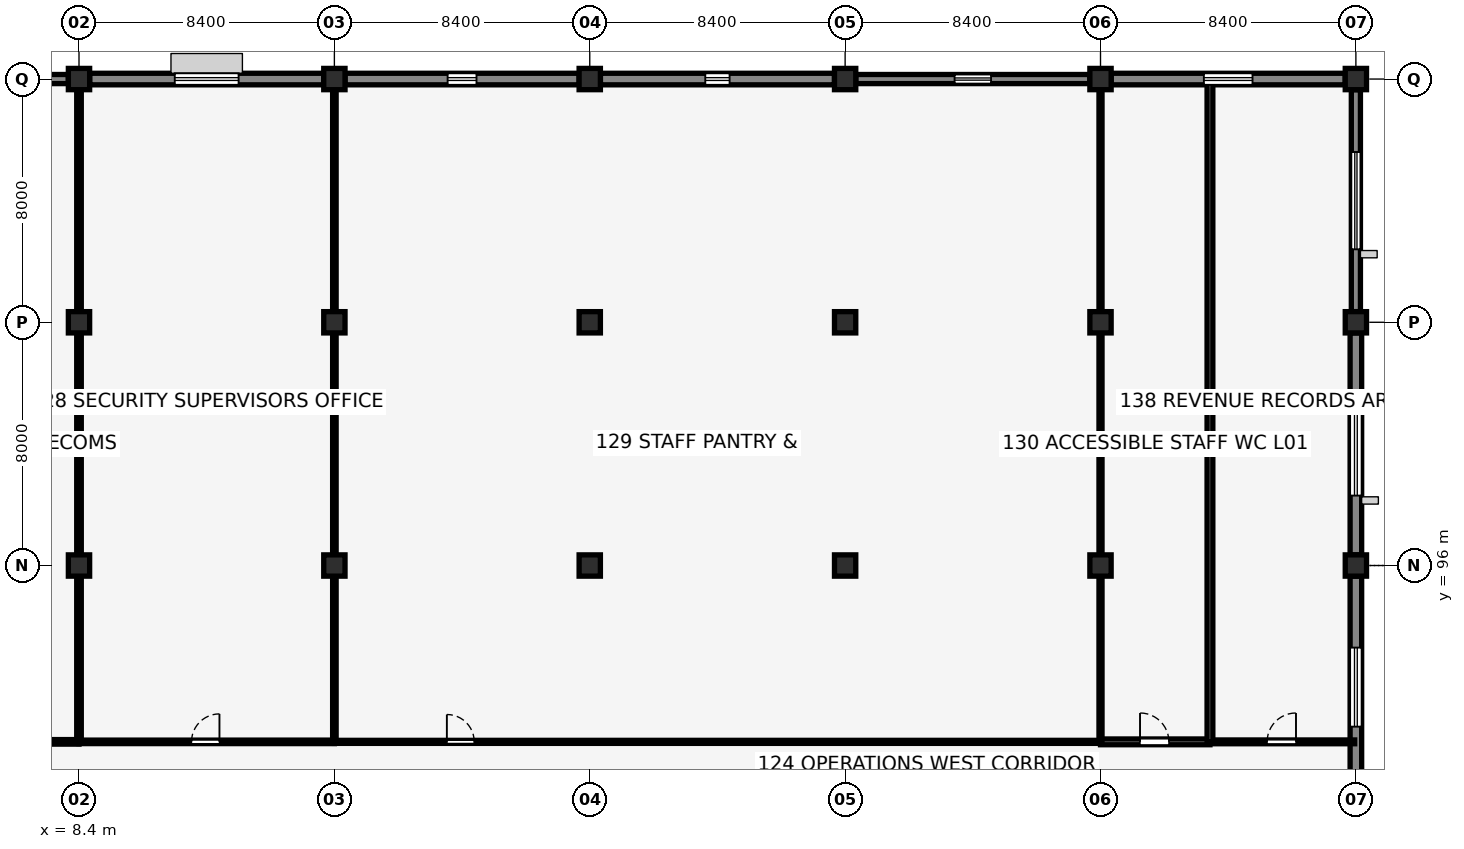
"""IFC4 building model, lengths in metres.
Left out: names, types, materials, properties, quantities, classifications, styles, units other than length and angle.
Written with IfcOpenShell. Run it as: python <this file> out.ifc"""

import sys

from ifc_helpers import new_model, si_unit, direction, frame, frame_2d, origin, origin_2d, place, context, subcontext, project, spatial, rectangle, extrude, element, fill, save


model = new_model("IFC4")
c1 = context("Model", 3, precision=1e-05, world=origin(), true_north=direction((0.0, 1.0)))
c2 = subcontext(c1, "Body", "Model", "MODEL_VIEW")
j1 = project(units=[si_unit("LENGTHUNIT", "METRE"), si_unit("PLANEANGLEUNIT", "RADIAN")], contexts=[c1])
p1 = place(None, origin())
s1 = spatial("IfcSite", under=j1, at=p1, CompositionType="ELEMENT")
p2 = place(p1, origin())
s2 = spatial("IfcBuilding", under=s1, at=p2, CompositionType="ELEMENT")
p3 = place(p2, frame((0.0, 0.0, 5.44)))
s3 = spatial("IfcBuildingStorey", under=s2, at=p3, CompositionType="ELEMENT", Elevation=5.44)
for number, where, z_axis, x_axis in (
    (1, (8.4, 96.0, 0.0), (0.0, 0.0, 1.0), (1.0, 0.0, 0.0)),
    (2, (8.4, 104.0, 0.0), (0.0, 0.0, 1.0), (1.0, 0.0, 0.0)),
    (3, (8.4, 112.0, 0.0), (0.0, 0.0, 1.0), (1.0, 0.0, 0.0)),
    (4, (16.8, 96.0, 0.0), (0.0, 0.0, 1.0), (1.0, 0.0, 0.0)),
    (5, (16.8, 104.0, 0.0), (0.0, 0.0, 1.0), (1.0, 0.0, 0.0)),
    (6, (16.8, 112.0, 0.0), (0.0, 0.0, 1.0), (1.0, 0.0, 0.0)),
    (7, (25.2, 96.0, 0.0), (0.0, 0.0, 1.0), (1.0, 0.0, 0.0)),
    (8, (25.2, 104.0, 0.0), (0.0, 0.0, 1.0), (1.0, 0.0, 0.0)),
    (9, (25.2, 112.0, 0.0), (0.0, 0.0, 1.0), (1.0, 0.0, 0.0)),
    (10, (33.6, 96.0, 0.0), (0.0, 0.0, 1.0), (1.0, 0.0, 0.0)),
    (11, (33.6, 104.0, 0.0), (0.0, 0.0, 1.0), (1.0, 0.0, 0.0)),
    (12, (33.6, 112.0, 0.0), (0.0, 0.0, 1.0), (1.0, 0.0, 0.0)),
    (13, (42.0, 96.0, 0.0), (0.0, 0.0, 1.0), (1.0, 0.0, 0.0)),
    (14, (42.0, 104.0, 0.0), (0.0, 0.0, 1.0), (1.0, 0.0, 0.0)),
    (15, (42.0, 112.0, 0.0), (0.0, 0.0, 1.0), (1.0, 0.0, 0.0)),
    (16, (50.4, 96.0, 0.0), (0.0, 0.0, 1.0), (1.0, 0.0, 0.0)),
    (17, (50.4, 104.0, 0.0), (0.0, 0.0, 1.0), (1.0, 0.0, 0.0)),
    (18, (50.4, 112.0, 0.0), (0.0, 0.0, 1.0), (1.0, 0.0, 0.0)),
):
    element("IfcColumn", number, at=place(p3, frame(where, z_axis=z_axis, x_axis=x_axis)), inside=s3, PredefinedType="COLUMN", context=c2, shape_type="SweptSolid", body=[
        extrude(rectangle(XDim=0.7, YDim=0.7, at=origin_2d()), origin(), (0.0, 0.0, 1.0), 3.8),
    ])
p4 = place(p3, frame((0.35, 112.0, 0.0), z_axis=(0.0, 0.0, 1.0), x_axis=(1.0, 0.0, 0.0)))
e19 = element("IfcWall", 19, at=p4, inside=s3, PredefinedType="SOLIDWALL", context=c2, shape_type="SweptSolid", body=[
    extrude(rectangle(XDim=7.7, YDim=0.3, at=frame_2d((3.85, 0.0))), origin(), (0.0, 0.0, 1.0), 3.45),
])
p5 = place(p4, frame((2.55, 0.0, 1.55), z_axis=(0.0, 0.0, 1.0), x_axis=(1.0, 0.0, 0.0)))
e20 = element("IfcOpeningElement", 20, at=p5, cuts=e19, PredefinedType="OPENING", context=c2, shape_type="SweptSolid", body=[
    extrude(rectangle(XDim=2.6, YDim=0.85, at=frame_2d((1.3, 0.425))), frame((0.0, 0.16, 0.0), z_axis=(0.0, -1.0, 0.0), x_axis=(1.0, 0.0, 0.0)), (0.0, 0.0, 1.0), 0.32),
])
p6 = place(p3, frame((8.75, 112.0, 0.0), z_axis=(0.0, 0.0, 1.0), x_axis=(1.0, 0.0, 0.0)))
e21 = element("IfcWall", 21, at=p6, inside=s3, PredefinedType="SOLIDWALL", context=c2, shape_type="SweptSolid", body=[
    extrude(rectangle(XDim=7.7, YDim=0.38, at=frame_2d((3.85, 0.0))), origin(), (0.0, 0.0, 1.0), 3.45),
])
p7 = place(p6, frame((2.8, 0.0, 1.55), z_axis=(0.0, 0.0, 1.0), x_axis=(1.0, 0.0, 0.0)))
e22 = element("IfcOpeningElement", 22, at=p7, cuts=e21, PredefinedType="OPENING", context=c2, shape_type="SweptSolid", body=[
    extrude(rectangle(XDim=2.1, YDim=0.8, at=frame_2d((1.05, 0.4))), frame((0.0, 0.2, 0.0), z_axis=(0.0, -1.0, 0.0), x_axis=(1.0, 0.0, 0.0)), (0.0, 0.0, 1.0), 0.4),
])
p8 = place(p3, frame((17.15, 112.0, 0.0), z_axis=(0.0, 0.0, 1.0), x_axis=(1.0, 0.0, 0.0)))
e23 = element("IfcWall", 23, at=p8, inside=s3, PredefinedType="SOLIDWALL", context=c2, shape_type="SweptSolid", body=[
    extrude(rectangle(XDim=7.7, YDim=0.38, at=frame_2d((3.85, 0.0))), origin(), (0.0, 0.0, 1.0), 3.45),
])
p9 = place(p8, frame((3.375, 0.0, 0.65), z_axis=(0.0, 0.0, 1.0), x_axis=(1.0, 0.0, 0.0)))
e24 = element("IfcOpeningElement", 24, at=p9, cuts=e23, PredefinedType="OPENING", context=c2, shape_type="SweptSolid", body=[
    extrude(rectangle(XDim=0.95, YDim=2.1, at=frame_2d((0.475, 1.05))), frame((0.0, 0.2, 0.0), z_axis=(0.0, -1.0, 0.0), x_axis=(1.0, 0.0, 0.0)), (0.0, 0.0, 1.0), 0.4),
])
p10 = place(p3, frame((25.55, 112.0, 0.0), z_axis=(0.0, 0.0, 1.0), x_axis=(1.0, 0.0, 0.0)))
e25 = element("IfcWall", 25, at=p10, inside=s3, PredefinedType="SOLIDWALL", context=c2, shape_type="SweptSolid", body=[
    extrude(rectangle(XDim=7.7, YDim=0.38, at=frame_2d((3.85, 0.0))), origin(), (0.0, 0.0, 1.0), 3.45),
])
p11 = place(p10, frame((3.45, 0.0, 0.65), z_axis=(0.0, 0.0, 1.0), x_axis=(1.0, 0.0, 0.0)))
e26 = element("IfcOpeningElement", 26, at=p11, cuts=e25, PredefinedType="OPENING", context=c2, shape_type="SweptSolid", body=[
    extrude(rectangle(XDim=0.8, YDim=1.85, at=frame_2d((0.4, 0.925))), frame((0.0, 0.2, 0.0), z_axis=(0.0, -1.0, 0.0), x_axis=(1.0, 0.0, 0.0)), (0.0, 0.0, 1.0), 0.4),
])
p12 = place(p3, frame((33.95, 112.0, 0.0), z_axis=(0.0, 0.0, 1.0), x_axis=(1.0, 0.0, 0.0)))
e27 = element("IfcWall", 27, at=p12, inside=s3, PredefinedType="SOLIDWALL", context=c2, shape_type="SweptSolid", body=[
    extrude(rectangle(XDim=7.7, YDim=0.3, at=frame_2d((3.85, 0.0))), origin(), (0.0, 0.0, 1.0), 3.45),
])
p13 = place(p12, frame((3.25, 0.0, 1.55), z_axis=(0.0, 0.0, 1.0), x_axis=(1.0, 0.0, 0.0)))
e28 = element("IfcOpeningElement", 28, at=p13, cuts=e27, PredefinedType="OPENING", context=c2, shape_type="SweptSolid", body=[
    extrude(rectangle(XDim=1.2, YDim=0.95, at=frame_2d((0.6, 0.475))), frame((0.0, 0.16, 0.0), z_axis=(0.0, -1.0, 0.0), x_axis=(1.0, 0.0, 0.0)), (0.0, 0.0, 1.0), 0.32),
])
p14 = place(p3, frame((42.35, 112.0, 0.0), z_axis=(0.0, 0.0, 1.0), x_axis=(1.0, 0.0, 0.0)))
e29 = element("IfcWall", 29, at=p14, inside=s3, PredefinedType="SOLIDWALL", context=c2, shape_type="SweptSolid", body=[
    extrude(rectangle(XDim=7.7, YDim=0.38, at=frame_2d((3.85, 0.0))), origin(), (0.0, 0.0, 1.0), 3.45),
])
p15 = place(p14, frame((3.05, 0.0, 0.9), z_axis=(0.0, 0.0, 1.0), x_axis=(1.0, 0.0, 0.0)))
e30 = element("IfcOpeningElement", 30, at=p15, cuts=e29, PredefinedType="OPENING", context=c2, shape_type="SweptSolid", body=[
    extrude(rectangle(XDim=1.6, YDim=1.2, at=frame_2d((0.8, 0.6))), frame((0.0, 0.2, 0.0), z_axis=(0.0, -1.0, 0.0), x_axis=(1.0, 0.0, 0.0)), (0.0, 0.0, 1.0), 0.4),
])
p16 = place(p3, frame((50.4, 88.35, 0.0), z_axis=(0.0, 0.0, 1.0), x_axis=(0.0, 1.0, 0.0)))
e31 = element("IfcWall", 31, at=p16, inside=s3, PredefinedType="SOLIDWALL", context=c2, shape_type="SweptSolid", body=[
    extrude(rectangle(XDim=7.3, YDim=0.38, at=frame_2d((3.65, 0.0))), origin(), (0.0, 0.0, 1.0), 3.442),
])
p17 = place(p16, frame((2.35, 0.0, 2.0), z_axis=(0.0, 0.0, 1.0), x_axis=(1.0, 0.0, 0.0)))
e32 = element("IfcOpeningElement", 32, at=p17, cuts=e31, PredefinedType="OPENING", context=c2, shape_type="SweptSolid", body=[
    extrude(rectangle(XDim=2.6, YDim=0.85, at=frame_2d((1.3, 0.425))), frame((0.0, 0.2, 0.0), z_axis=(0.0, -1.0, 0.0), x_axis=(1.0, 0.0, 0.0)), (0.0, 0.0, 1.0), 0.4),
])
p18 = place(p3, frame((50.4, 96.35, 0.0), z_axis=(0.0, 0.0, 1.0), x_axis=(0.0, 1.0, 0.0)))
e33 = element("IfcWall", 33, at=p18, inside=s3, PredefinedType="SOLIDWALL", context=c2, shape_type="SweptSolid", body=[
    extrude(rectangle(XDim=7.3, YDim=0.38, at=frame_2d((3.65, 0.0))), origin(), (0.0, 0.0, 1.0), 3.442),
])
p19 = place(p18, frame((1.95, 0.0, 0.9), z_axis=(0.0, 0.0, 1.0), x_axis=(1.0, 0.0, 0.0)))
e34 = element("IfcOpeningElement", 34, at=p19, cuts=e33, PredefinedType="OPENING", context=c2, shape_type="SweptSolid", body=[
    extrude(rectangle(XDim=3.4, YDim=1.7, at=frame_2d((1.7, 0.85))), frame((0.0, 0.2, 0.0), z_axis=(0.0, -1.0, 0.0), x_axis=(1.0, 0.0, 0.0)), (0.0, 0.0, 1.0), 0.4),
])
p20 = place(p3, frame((50.4, 104.35, 0.0), z_axis=(0.0, 0.0, 1.0), x_axis=(0.0, 1.0, 0.0)))
e35 = element("IfcWall", 35, at=p20, inside=s3, PredefinedType="SOLIDWALL", context=c2, shape_type="SweptSolid", body=[
    extrude(rectangle(XDim=7.3, YDim=0.3, at=frame_2d((3.65, 0.0))), origin(), (0.0, 0.0, 1.0), 3.442),
])
p21 = place(p20, frame((2.05, 0.0, 0.9), z_axis=(0.0, 0.0, 1.0), x_axis=(1.0, 0.0, 0.0)))
e36 = element("IfcOpeningElement", 36, at=p21, cuts=e35, PredefinedType="OPENING", context=c2, shape_type="SweptSolid", body=[
    extrude(rectangle(XDim=3.2, YDim=1.65, at=frame_2d((1.6, 0.825))), frame((0.0, 0.16, 0.0), z_axis=(0.0, -1.0, 0.0), x_axis=(1.0, 0.0, 0.0)), (0.0, 0.0, 1.0), 0.32),
])
p22 = place(p3, frame((0.04, 90.2, 0.0), z_axis=(0.0, 0.0, 1.0), x_axis=(1.0, 0.0, 0.0)))
e37 = element("IfcWall", 37, at=p22, inside=s3, PredefinedType="PARTITIONING", context=c2, shape_type="SweptSolid", body=[
    extrude(rectangle(XDim=8.36, YDim=0.15, at=frame_2d((4.18, 0.0))), origin(), (0.0, 0.0, 1.0), 3.8),
])
p23 = place(p22, frame((3.66, 0.0, 0.0), z_axis=(0.0, 0.0, 1.0), x_axis=(1.0, 0.0, 0.0)))
e38 = element("IfcOpeningElement", 38, at=p23, cuts=e37, PredefinedType="OPENING", context=c2, shape_type="SweptSolid", body=[
    extrude(rectangle(XDim=1.0, YDim=2.15, at=frame_2d((0.5, 1.075))), frame((0.0, 0.085, 0.0), z_axis=(0.0, -1.0, 0.0), x_axis=(1.0, 0.0, 0.0)), (0.0, 0.0, 1.0), 0.17),
])
p24 = place(p3, frame((8.4, 90.2, 0.0), z_axis=(0.0, 0.0, 1.0), x_axis=(1.0, 0.0, 0.0)))
e39 = element("IfcWall", 39, at=p24, inside=s3, PredefinedType="PARTITIONING", context=c2, shape_type="SweptSolid", body=[
    extrude(rectangle(XDim=8.4, YDim=0.115, at=frame_2d((4.2, 0.0))), origin(), (0.0, 0.0, 1.0), 3.8),
])
p25 = place(p24, frame((3.7, 0.0, 0.0), z_axis=(0.0, 0.0, 1.0), x_axis=(1.0, 0.0, 0.0)))
e40 = element("IfcOpeningElement", 40, at=p25, cuts=e39, PredefinedType="OPENING", context=c2, shape_type="SweptSolid", body=[
    extrude(rectangle(XDim=0.92, YDim=2.12, at=frame_2d((0.46, 1.06))), frame((0.0, 0.067, 0.0), z_axis=(0.0, -1.0, 0.0), x_axis=(1.0, 0.0, 0.0)), (0.0, 0.0, 1.0), 0.135),
])
p26 = place(p3, frame((16.8, 90.2, 0.0), z_axis=(0.0, 0.0, 1.0), x_axis=(1.0, 0.0, 0.0)))
e41 = element("IfcWall", 41, at=p26, inside=s3, PredefinedType="PARTITIONING", context=c2, shape_type="SweptSolid", body=[
    extrude(rectangle(XDim=25.2, YDim=0.1, at=frame_2d((12.6, 0.0))), origin(), (0.0, 0.0, 1.0), 3.337),
])
p27 = place(p26, frame((3.7, 0.0, 0.0), z_axis=(0.0, 0.0, 1.0), x_axis=(1.0, 0.0, 0.0)))
e42 = element("IfcOpeningElement", 42, at=p27, cuts=e41, PredefinedType="OPENING", context=c2, shape_type="SweptSolid", body=[
    extrude(rectangle(XDim=0.9, YDim=2.1, at=frame_2d((0.45, 1.05))), frame((0.0, 0.06, 0.0), z_axis=(0.0, -1.0, 0.0), x_axis=(1.0, 0.0, 0.0)), (0.0, 0.0, 1.0), 0.12),
])
p28 = place(p3, frame((42.0, 90.2, 0.0), z_axis=(0.0, 0.0, 1.0), x_axis=(1.0, 0.0, 0.0)))
e43 = element("IfcWall", 43, at=p28, inside=s3, PredefinedType="PLUMBINGWALL", context=c2, shape_type="SweptSolid", body=[
    extrude(rectangle(XDim=3.6, YDim=0.19, at=frame_2d((1.8, 0.0))), origin(), (0.0, 0.0, 1.0), 3.8),
])
p29 = place(p28, frame((1.3, 0.0, 0.0), z_axis=(0.0, 0.0, 1.0), x_axis=(1.0, 0.0, 0.0)))
e44 = element("IfcOpeningElement", 44, at=p29, cuts=e43, PredefinedType="OPENING", context=c2, shape_type="SweptSolid", body=[
    extrude(rectangle(XDim=0.95, YDim=2.15, at=frame_2d((0.475, 1.075))), frame((0.0, 0.105, 0.0), z_axis=(0.0, -1.0, 0.0), x_axis=(1.0, 0.0, 0.0)), (0.0, 0.0, 1.0), 0.21),
])
p30 = place(p3, frame((45.6, 90.2, 0.0), z_axis=(0.0, 0.0, 1.0), x_axis=(1.0, 0.0, 0.0)))
e45 = element("IfcWall", 45, at=p30, inside=s3, PredefinedType="PARTITIONING", context=c2, shape_type="SweptSolid", body=[
    extrude(rectangle(XDim=4.76, YDim=0.125, at=frame_2d((2.38, 0.0))), origin(), (0.0, 0.0, 1.0), 3.8),
])
p31 = place(p30, frame((1.88, 0.0, 0.0), z_axis=(0.0, 0.0, 1.0), x_axis=(1.0, 0.0, 0.0)))
e46 = element("IfcOpeningElement", 46, at=p31, cuts=e45, PredefinedType="OPENING", context=c2, shape_type="SweptSolid", body=[
    extrude(rectangle(XDim=0.95, YDim=2.15, at=frame_2d((0.475, 1.075))), frame((0.0, 0.073, 0.0), z_axis=(0.0, -1.0, 0.0), x_axis=(1.0, 0.0, 0.0)), (0.0, 0.0, 1.0), 0.145),
])
p32 = place(p3, frame((8.4, 90.2, 0.0), z_axis=(0.0, 0.0, 1.0), x_axis=(0.0, 1.0, 0.0)))
e47 = element("IfcWall", 47, at=p32, inside=s3, PredefinedType="PARTITIONING", context=c2, shape_type="SweptSolid", body=[
    extrude(rectangle(XDim=5.46, YDim=0.15, at=frame_2d((2.73, 0.0))), origin(), (0.0, 0.0, 1.0), 3.337),
])
for number, where, z_axis, x_axis in (
    (48, (8.4, 96.34, 0.0), (0.0, 0.0, 1.0), (0.0, 1.0, 0.0)),
    (49, (8.4, 104.34, 0.0), (0.0, 0.0, 1.0), (0.0, 1.0, 0.0)),
):
    element("IfcWall", number, at=place(p3, frame(where, z_axis=z_axis, x_axis=x_axis)), inside=s3, PredefinedType="PARTITIONING", context=c2, shape_type="SweptSolid", body=[
        extrude(rectangle(XDim=7.32, YDim=0.15, at=frame_2d((3.66, 0.0))), origin(), (0.0, 0.0, 1.0), 3.337),
    ])
p33 = place(p3, frame((16.8, 90.2, 0.0), z_axis=(0.0, 0.0, 1.0), x_axis=(0.0, 1.0, 0.0)))
e50 = element("IfcWall", 50, at=p33, inside=s3, PredefinedType="PARTITIONING", context=c2, shape_type="SweptSolid", body=[
    extrude(rectangle(XDim=5.46, YDim=0.115, at=frame_2d((2.73, 0.0))), origin(), (0.0, 0.0, 1.0), 3.337),
])
for number, where, z_axis, x_axis in (
    (51, (16.8, 96.34, 0.0), (0.0, 0.0, 1.0), (0.0, 1.0, 0.0)),
    (52, (16.8, 104.34, 0.0), (0.0, 0.0, 1.0), (0.0, 1.0, 0.0)),
):
    element("IfcWall", number, at=place(p3, frame(where, z_axis=z_axis, x_axis=x_axis)), inside=s3, PredefinedType="PARTITIONING", context=c2, shape_type="SweptSolid", body=[
        extrude(rectangle(XDim=7.32, YDim=0.115, at=frame_2d((3.66, 0.0))), origin(), (0.0, 0.0, 1.0), 3.337),
    ])
p34 = place(p3, frame((42.0, 90.2, 0.0), z_axis=(0.0, 0.0, 1.0), x_axis=(0.0, 1.0, 0.0)))
e53 = element("IfcWall", 53, at=p34, inside=s3, PredefinedType="PARTITIONING", context=c2, shape_type="SweptSolid", body=[
    extrude(rectangle(XDim=5.46, YDim=0.1, at=frame_2d((2.73, 0.0))), origin(), (0.0, 0.0, 1.0), 3.337),
])
for number, where, z_axis, x_axis in (
    (54, (42.0, 96.34, 0.0), (0.0, 0.0, 1.0), (0.0, 1.0, 0.0)),
    (55, (42.0, 104.34, 0.0), (0.0, 0.0, 1.0), (0.0, 1.0, 0.0)),
):
    element("IfcWall", number, at=place(p3, frame(where, z_axis=z_axis, x_axis=x_axis)), inside=s3, PredefinedType="PARTITIONING", context=c2, shape_type="SweptSolid", body=[
        extrude(rectangle(XDim=7.32, YDim=0.1, at=frame_2d((3.66, 0.0))), origin(), (0.0, 0.0, 1.0), 3.337),
    ])
p35 = place(p3, frame((45.6, 90.2, 0.0), z_axis=(0.0, 0.0, 1.0), x_axis=(0.0, 1.0, 0.0)))
e56 = element("IfcWall", 56, at=p35, inside=s3, PredefinedType="PLUMBINGWALL", context=c2, shape_type="SweptSolid", body=[
    extrude(rectangle(XDim=21.76, YDim=0.19, at=frame_2d((10.88, 0.0))), origin(), (0.0, 0.0, 1.0), 3.8),
])
p36 = place(p7, origin())
e57 = element("IfcWindow", 57, at=p36, inside=s3, PartitioningType="DOUBLE_PANEL_HORIZONTAL", PredefinedType="WINDOW", context=c2, shape_type="SweptSolid", body=[
    extrude(rectangle(XDim=2.1, YDim=0.8, at=frame_2d((1.05, 0.4))), frame((0.0, 0.03, 0.0), z_axis=(0.0, -1.0, 0.0), x_axis=(1.0, 0.0, 0.0)), (0.0, 0.0, 1.0), 0.06),
])
fill(e22, e57)
p37 = place(p9, origin())
e58 = element("IfcWindow", 58, at=p37, inside=s3, PartitioningType="SINGLE_PANEL", PredefinedType="WINDOW", context=c2, shape_type="SweptSolid", body=[
    extrude(rectangle(XDim=0.95, YDim=2.1, at=frame_2d((0.475, 1.05))), frame((0.0, 0.03, 0.0), z_axis=(0.0, -1.0, 0.0), x_axis=(1.0, 0.0, 0.0)), (0.0, 0.0, 1.0), 0.06),
])
fill(e24, e58)
p38 = place(p11, origin())
e59 = element("IfcWindow", 59, at=p38, inside=s3, PartitioningType="SINGLE_PANEL", PredefinedType="WINDOW", context=c2, shape_type="SweptSolid", body=[
    extrude(rectangle(XDim=0.8, YDim=1.85, at=frame_2d((0.4, 0.925))), frame((0.0, 0.03, 0.0), z_axis=(0.0, -1.0, 0.0), x_axis=(1.0, 0.0, 0.0)), (0.0, 0.0, 1.0), 0.06),
])
fill(e26, e59)
p39 = place(p13, origin())
e60 = element("IfcWindow", 60, at=p39, inside=s3, PartitioningType="SINGLE_PANEL", PredefinedType="WINDOW", context=c2, shape_type="SweptSolid", body=[
    extrude(rectangle(XDim=1.2, YDim=0.95, at=frame_2d((0.6, 0.475))), frame((0.0, 0.03, 0.0), z_axis=(0.0, -1.0, 0.0), x_axis=(1.0, 0.0, 0.0)), (0.0, 0.0, 1.0), 0.06),
])
fill(e28, e60)
p40 = place(p15, origin())
e61 = element("IfcWindow", 61, at=p40, inside=s3, PartitioningType="DOUBLE_PANEL_VERTICAL", PredefinedType="WINDOW", context=c2, shape_type="SweptSolid", body=[
    extrude(rectangle(XDim=1.6, YDim=1.2, at=frame_2d((0.8, 0.6))), frame((0.0, 0.03, 0.0), z_axis=(0.0, -1.0, 0.0), x_axis=(1.0, 0.0, 0.0)), (0.0, 0.0, 1.0), 0.06),
])
fill(e30, e61)
p41 = place(p17, origin())
e62 = element("IfcWindow", 62, at=p41, inside=s3, PartitioningType="DOUBLE_PANEL_HORIZONTAL", PredefinedType="WINDOW", context=c2, shape_type="SweptSolid", body=[
    extrude(rectangle(XDim=2.6, YDim=0.85, at=frame_2d((1.3, 0.425))), frame((0.0, 0.03, 0.0), z_axis=(0.0, -1.0, 0.0), x_axis=(1.0, 0.0, 0.0)), (0.0, 0.0, 1.0), 0.06),
])
fill(e32, e62)
p42 = place(p19, origin())
e63 = element("IfcWindow", 63, at=p42, inside=s3, PartitioningType="TRIPLE_PANEL_VERTICAL", PredefinedType="WINDOW", context=c2, shape_type="SweptSolid", body=[
    extrude(rectangle(XDim=3.4, YDim=1.7, at=frame_2d((1.7, 0.85))), frame((0.0, 0.03, 0.0), z_axis=(0.0, -1.0, 0.0), x_axis=(1.0, 0.0, 0.0)), (0.0, 0.0, 1.0), 0.06),
])
fill(e34, e63)
p43 = place(p21, origin())
e64 = element("IfcWindow", 64, at=p43, inside=s3, PartitioningType="TRIPLE_PANEL_VERTICAL", PredefinedType="WINDOW", context=c2, shape_type="SweptSolid", body=[
    extrude(rectangle(XDim=3.2, YDim=1.65, at=frame_2d((1.6, 0.825))), frame((0.0, 0.03, 0.0), z_axis=(0.0, -1.0, 0.0), x_axis=(1.0, 0.0, 0.0)), (0.0, 0.0, 1.0), 0.06),
])
fill(e36, e64)
p44 = place(p25, origin())
e65 = element("IfcDoor", 65, at=p44, inside=s3, OperationType="SINGLE_SWING_RIGHT", PredefinedType="DOOR", context=c2, shape_type="SweptSolid", body=[
    extrude(rectangle(XDim=0.92, YDim=2.12, at=frame_2d((0.46, 1.06))), frame((0.0, 0.025, 0.0), z_axis=(0.0, -1.0, 0.0), x_axis=(1.0, 0.0, 0.0)), (0.0, 0.0, 1.0), 0.05),
])
fill(e40, e65)
p45 = place(p27, origin())
e66 = element("IfcDoor", 66, at=p45, inside=s3, OperationType="SINGLE_SWING_LEFT", PredefinedType="DOOR", context=c2, shape_type="SweptSolid", body=[
    extrude(rectangle(XDim=0.9, YDim=2.1, at=frame_2d((0.45, 1.05))), frame((0.0, 0.025, 0.0), z_axis=(0.0, -1.0, 0.0), x_axis=(1.0, 0.0, 0.0)), (0.0, 0.0, 1.0), 0.05),
])
fill(e42, e66)
p46 = place(p29, origin())
e67 = element("IfcDoor", 67, at=p46, inside=s3, OperationType="SINGLE_SWING_LEFT", PredefinedType="DOOR", context=c2, shape_type="SweptSolid", body=[
    extrude(rectangle(XDim=0.95, YDim=2.15, at=frame_2d((0.475, 1.075))), frame((0.0, 0.025, 0.0), z_axis=(0.0, -1.0, 0.0), x_axis=(1.0, 0.0, 0.0)), (0.0, 0.0, 1.0), 0.05),
])
fill(e44, e67)
p47 = place(p31, origin())
e68 = element("IfcDoor", 68, at=p47, inside=s3, OperationType="SINGLE_SWING_RIGHT", PredefinedType="DOOR", context=c2, shape_type="SweptSolid", body=[
    extrude(rectangle(XDim=0.95, YDim=2.15, at=frame_2d((0.475, 1.075))), frame((0.0, 0.025, 0.0), z_axis=(0.0, -1.0, 0.0), x_axis=(1.0, 0.0, 0.0)), (0.0, 0.0, 1.0), 0.05),
])
fill(e46, e68)
save(model, sys.argv[1])
